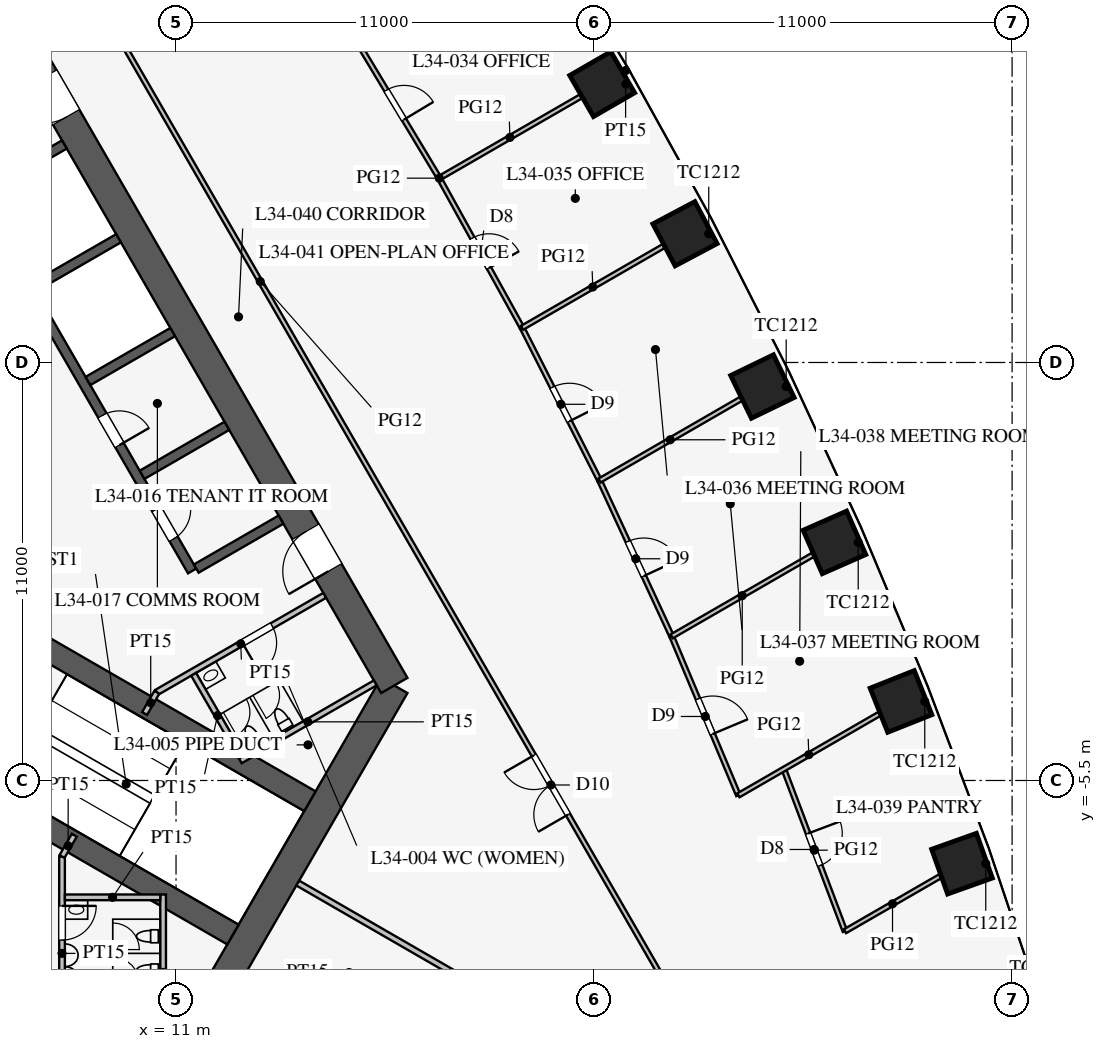
"""IFC4 building model, lengths in metres.
Left out: names, types, materials, properties, quantities, classifications, styles, units other than length and angle.
Written with IfcOpenShell. Run it as: python <this file> out.ifc"""

import sys

from ifc_helpers import new_model, si_unit, direction, frame, frame_2d, origin, origin_2d, place, context, subcontext, project, spatial, rectangle, extrude, element, fill, save


model = new_model("IFC4")
c1 = context("Model", 3, precision=1e-05, world=origin(), true_north=direction((0.0, 1.0)))
c2 = subcontext(c1, "Body", "Model", "MODEL_VIEW")
j1 = project(units=[si_unit("LENGTHUNIT", "METRE"), si_unit("PLANEANGLEUNIT", "RADIAN")], contexts=[c1])
p1 = place(None, origin())
s1 = spatial("IfcSite", under=j1, at=p1, CompositionType="ELEMENT")
p2 = place(p1, origin())
s2 = spatial("IfcBuilding", under=s1, at=p2, CompositionType="ELEMENT")
p3 = place(p2, frame((0.0, 0.0, 149.3)))
s3 = spatial("IfcBuildingStorey", under=s2, at=p3, CompositionType="ELEMENT", Elevation=149.3)
for number, where, z_axis, x_axis in (
    (1, (31.682, -7.689, 0.0), (0.0, 0.0, 1.0), (-0.336, 0.942, 0.0)),
    (2, (30.077, -3.42, 0.0), (0.0, 0.0, 1.0), (-0.37, 0.929, 0.0)),
    (3, (28.325, 0.765, 0.0), (0.0, 0.0, 1.0), (-0.403, 0.915, 0.0)),
    (4, (26.43, 4.867, 0.0), (0.0, 0.0, 1.0), (-0.436, 0.9, 0.0)),
    (5, (24.393, 8.887, 0.0), (0.0, 0.0, 1.0), (-0.468, 0.883, 0.0)),
    (6, (22.213, 12.825, 0.0), (0.0, 0.0, 1.0), (-0.5, 0.866, 0.0)),
):
    element("IfcColumn", number, at=place(p3, frame(where, z_axis=z_axis, x_axis=x_axis)), inside=s3, PredefinedType="COLUMN", context=c2, shape_type="SweptSolid", body=[
        extrude(rectangle(XDim=1.25, YDim=1.25, at=origin_2d()), origin(), (0.0, 0.0, 1.0), 4.2),
    ])
p4 = place(p3, frame((10.97, -13.0, 0.0), z_axis=(0.0, 0.0, 1.0), x_axis=(0.499995765644, 0.866027848477, 0.0)))
e7 = element("IfcWall", 7, at=p4, inside=s3, PredefinedType="SHEAR", context=c2, shape_type="SweptSolid", body=[
    extrude(rectangle(XDim=11.547, YDim=0.8, at=frame_2d((5.773, 0.0))), origin(), (0.0, 0.0, 1.0), 4.2),
])
p5 = place(p3, frame((16.743, -3.0, 0.0), z_axis=(0.0, 0.0, 1.0), x_axis=(-0.500002442456, 0.866023993627, 0.0)))
e8 = element("IfcWall", 8, at=p5, inside=s3, PredefinedType="SHEAR", context=c2, shape_type="SweptSolid", body=[
    extrude(rectangle(XDim=21.939, YDim=0.8, at=frame_2d((10.97, 0.0))), origin(), (0.0, 0.0, 1.0), 4.2),
])
p6 = place(p5, frame((17.27, 0.0, 0.0)))
e9 = element("IfcOpeningElement", 9, at=p6, cuts=e8, PredefinedType="OPENING", context=c2, shape_type="SweptSolid", body=[
    extrude(rectangle(XDim=1.2, YDim=2.1, at=frame_2d((0.6, 1.05))), frame((0.0, 0.41, 0.0), z_axis=(0.0, -1.0, 0.0), x_axis=(1.0, 0.0, 0.0)), (0.0, 0.0, 1.0), 0.82),
])
p7 = place(p5, frame((3.47, 0.0, 0.0)))
e10 = element("IfcOpeningElement", 10, at=p7, cuts=e8, PredefinedType="OPENING", context=c2, shape_type="SweptSolid", body=[
    extrude(rectangle(XDim=1.2, YDim=2.1, at=frame_2d((0.6, 1.05))), frame((0.0, 0.41, 0.0), z_axis=(0.0, -1.0, 0.0), x_axis=(1.0, 0.0, 0.0)), (0.0, 0.0, 1.0), 0.82),
])
p8 = place(p3, frame((11.424, 0.014, 0.0), z_axis=(0.0, 0.0, 1.0), x_axis=(-0.500001763848, 0.866024385424, 0.0)))
e11 = element("IfcWall", 11, at=p8, inside=s3, PredefinedType="SHEAR", context=c2, shape_type="SweptSolid", body=[
    extrude(rectangle(XDim=11.4, YDim=0.25, at=frame_2d((5.7, 0.0))), origin(), (0.0, 0.0, 1.0), 4.2),
])
p9 = place(p8, frame((0.975, 0.0, 0.0)))
e12 = element("IfcOpeningElement", 12, at=p9, cuts=e11, PredefinedType="OPENING", context=c2, shape_type="SweptSolid", body=[
    extrude(rectangle(XDim=0.9, YDim=2.1, at=frame_2d((0.45, 1.05))), frame((0.0, 0.135, 0.0), z_axis=(0.0, -1.0, 0.0), x_axis=(1.0, 0.0, 0.0)), (0.0, 0.0, 1.0), 0.27),
])
p10 = place(p8, frame((3.825, 0.0, 0.0)))
e13 = element("IfcOpeningElement", 13, at=p10, cuts=e11, PredefinedType="OPENING", context=c2, shape_type="SweptSolid", body=[
    extrude(rectangle(XDim=0.9, YDim=2.1, at=frame_2d((0.45, 1.05))), frame((0.0, 0.135, 0.0), z_axis=(0.0, -1.0, 0.0), x_axis=(1.0, 0.0, 0.0)), (0.0, 0.0, 1.0), 0.27),
])
for number, where, z_axis, x_axis in (
    (14, (11.532, 0.076, 0.0), (0.0, 0.0, 1.0), (0.866, 0.5, 0.0)),
    (15, (10.107, 2.544, 0.0), (0.0, 0.0, 1.0), (0.866, 0.5, 0.0)),
    (16, (8.682, 5.012, 0.0), (0.0, 0.0, 1.0), (0.866, 0.5, 0.0)),
    (17, (7.257, 7.481, 0.0), (0.0, 0.0, 1.0), (0.866, 0.5, 0.0)),
):
    element("IfcWall", number, at=place(p3, frame(where, z_axis=z_axis, x_axis=x_axis)), inside=s3, PredefinedType="SHEAR", context=c2, shape_type="SweptSolid", body=[
        extrude(rectangle(XDim=2.575, YDim=0.25, at=frame_2d((1.288, 0.0))), origin(), (0.0, 0.0, 1.0), 4.2),
    ])
p11 = place(p3, frame((5.832, 9.949, 0.0), z_axis=(0.0, 0.0, 1.0), x_axis=(0.866029291668, 0.499993265928, 0.0)))
e18 = element("IfcWall", 18, at=p11, inside=s3, PredefinedType="SHEAR", context=c2, shape_type="SweptSolid", body=[
    extrude(rectangle(XDim=2.575, YDim=0.25, at=frame_2d((1.288, 0.0))), origin(), (0.0, 0.0, 1.0), 4.2),
])
for number, where, z_axis, x_axis in (
    (19, (4.638, -5.016, 0.0), (0.0, 0.0, 1.0), (0.866, -0.5, 0.0)),
    (20, (6.663, -1.509, 0.0), (0.0, 0.0, 1.0), (0.866, -0.5, 0.0)),
):
    element("IfcWall", number, at=place(p3, frame(where, z_axis=z_axis, x_axis=x_axis)), inside=s3, PredefinedType="SHEAR", context=c2, shape_type="SweptSolid", body=[
        extrude(rectangle(XDim=9.075, YDim=0.6, at=frame_2d((4.538, 0.0))), origin(), (0.0, 0.0, 1.0), 4.2),
    ])
p12 = place(p3, frame((8.0, -7.5, 0.0), z_axis=(0.0, 0.0, 1.0), x_axis=(0.0, -1.0, 0.0)))
e21 = element("IfcWall", 21, at=p12, inside=s3, PredefinedType="PARTITIONING", context=c2, shape_type="SweptSolid", body=[
    extrude(rectangle(XDim=5.1, YDim=0.15, at=frame_2d((2.55, 0.0))), origin(), (0.0, 0.0, 1.0), 4.0),
])
p13 = place(p12, frame((1.3, 0.0, 0.0)))
e22 = element("IfcOpeningElement", 22, at=p13, cuts=e21, PredefinedType="OPENING", context=c2, shape_type="SweptSolid", body=[
    extrude(rectangle(XDim=0.9, YDim=2.1, at=frame_2d((0.45, 1.05))), frame((0.0, 0.085, 0.0), z_axis=(0.0, -1.0, 0.0), x_axis=(1.0, 0.0, 0.0)), (0.0, 0.0, 1.0), 0.17),
])
p14 = place(p3, frame((10.495, -3.178, 0.0), z_axis=(0.0, 0.0, 1.0), x_axis=(0.86602216432, 0.500005610874, 0.0)))
e23 = element("IfcWall", 23, at=p14, inside=s3, PredefinedType="PARTITIONING", context=c2, shape_type="SweptSolid", body=[
    extrude(rectangle(XDim=5.1, YDim=0.15, at=frame_2d((2.55, 0.0))), origin(), (0.0, 0.0, 1.0), 4.0),
])
p15 = place(p14, frame((2.6, 0.0, 0.0)))
e24 = element("IfcOpeningElement", 24, at=p15, cuts=e23, PredefinedType="OPENING", context=c2, shape_type="SweptSolid", body=[
    extrude(rectangle(XDim=0.9, YDim=2.1, at=frame_2d((0.45, 1.05))), frame((0.0, 0.085, 0.0), z_axis=(0.0, -1.0, 0.0), x_axis=(1.0, 0.0, 0.0)), (0.0, 0.0, 1.0), 0.17),
])
for number, where, z_axis, x_axis in (
    (25, (8.0, -7.5, 0.0), (0.0, 0.0, 1.0), (0.5, 0.866, 0.0)),
    (26, (10.495, -3.178, 0.0), (0.0, 0.0, 1.0), (-0.5, -0.866, 0.0)),
):
    element("IfcWall", number, at=place(p3, frame(where, z_axis=z_axis, x_axis=x_axis)), inside=s3, PredefinedType="PARTITIONING", context=c2, shape_type="SweptSolid", body=[
        extrude(rectangle(XDim=0.645, YDim=0.15, at=frame_2d((0.323, 0.0))), origin(), (0.0, 0.0, 1.0), 4.0),
    ])
p16 = place(p3, frame((10.66, -8.5, 0.0), z_axis=(0.0, 0.0, 1.0), x_axis=(0.0, -1.0, 0.0)))
e27 = element("IfcWall", 27, at=p16, inside=s3, PredefinedType="PARTITIONING", context=c2, shape_type="SweptSolid", body=[
    extrude(rectangle(XDim=4.1, YDim=0.15, at=frame_2d((2.05, 0.0))), origin(), (0.0, 0.0, 1.0), 4.0),
])
p17 = place(p3, frame((8.075, -8.575, 0.0), z_axis=(0.0, 0.0, 1.0), x_axis=(1.0, 0.0, 0.0)))
e28 = element("IfcWall", 28, at=p17, inside=s3, PredefinedType="PARTITIONING", context=c2, shape_type="SweptSolid", body=[
    extrude(rectangle(XDim=2.51, YDim=0.15, at=frame_2d((1.255, 0.0))), origin(), (0.0, 0.0, 1.0), 4.0),
])
p18 = place(p3, frame((12.691, -4.982, 0.0), z_axis=(0.0, 0.0, 1.0), x_axis=(0.8660249478, 0.500000789788, 0.0)))
e29 = element("IfcWall", 29, at=p18, inside=s3, PredefinedType="PARTITIONING", context=c2, shape_type="SweptSolid", body=[
    extrude(rectangle(XDim=4.1, YDim=0.15, at=frame_2d((2.05, 0.0))), origin(), (0.0, 0.0, 1.0), 4.0),
])
p19 = place(p3, frame((11.464, -2.706, 0.0), z_axis=(0.0, 0.0, 1.0), x_axis=(0.50001992892, -0.866013897511, 0.0)))
e30 = element("IfcWall", 30, at=p19, inside=s3, PredefinedType="PARTITIONING", context=c2, shape_type="SweptSolid", body=[
    extrude(rectangle(XDim=2.51, YDim=0.15, at=frame_2d((1.255, 0.0))), origin(), (0.0, 0.0, 1.0), 4.0),
])
p20 = place(p3, frame((14.203, -8.2, 0.0), z_axis=(0.0, 0.0, 1.0), x_axis=(0.866024668836, -0.500001272966, 0.0)))
e31 = element("IfcWall", 31, at=p20, inside=s3, PredefinedType="PARTITIONING", context=c2, shape_type="SweptSolid", body=[
    extrude(rectangle(XDim=16.65, YDim=0.15, at=frame_2d((8.325, 0.0))), origin(), (0.0, 0.0, 1.0), 2.3),
])
p21 = place(p3, frame((26.415, -15.231, 0.0), z_axis=(0.0, 0.0, 1.0), x_axis=(-0.50000091641, 0.866024874695, 0.0)))
e32 = element("IfcWall", 32, at=p21, inside=s3, PredefinedType="PARTITIONING", context=c2, shape_type="SweptSolid", body=[
    extrude(rectangle(XDim=52.796, YDim=0.12, at=frame_2d((26.398, 0.0))), origin(), (0.0, 0.0, 1.0), 2.9),
])
p22 = place(p21, frame((10.2, 0.0, 0.15)))
e33 = element("IfcOpeningElement", 33, at=p22, cuts=e32, PredefinedType="OPENING", context=c2, shape_type="SweptSolid", body=[
    extrude(rectangle(XDim=1.8, YDim=2.1, at=frame_2d((0.9, 1.05))), frame((0.0, 0.07, 0.0), z_axis=(0.0, -1.0, 0.0), x_axis=(1.0, 0.0, 0.0)), (0.0, 0.0, 1.0), 0.14),
])
p23 = place(p21, frame((40.8, 0.0, 0.15)))
e34 = element("IfcOpeningElement", 34, at=p23, cuts=e32, PredefinedType="OPENING", context=c2, shape_type="SweptSolid", body=[
    extrude(rectangle(XDim=1.8, YDim=2.1, at=frame_2d((0.9, 1.05))), frame((0.0, 0.07, 0.0), z_axis=(0.0, -1.0, 0.0), x_axis=(1.0, 0.0, 0.0)), (0.0, 0.0, 1.0), 0.14),
])
p24 = place(p3, frame((22.758, 13.139, 0.0), z_axis=(0.0, 0.0, 1.0), x_axis=(0.866063163075, 0.499934593286, 0.0)))
e35 = element("IfcWall", 35, at=p24, inside=s3, PredefinedType="PARTITIONING", context=c2, shape_type="SweptSolid", body=[
    extrude(rectangle(XDim=0.166, YDim=0.15, at=frame_2d((0.083, 0.0))), origin(), (0.0, 0.0, 1.0), 2.9),
])
p25 = place(p3, frame((17.927, 10.35, 0.0), z_axis=(0.0, 0.0, 1.0), x_axis=(-0.515548366618, 0.856860479703, 0.0)))
e36 = element("IfcWall", 36, at=p25, inside=s3, PredefinedType="PARTITIONING", context=c2, shape_type="SweptSolid", body=[
    extrude(rectangle(XDim=4.501, YDim=0.12, at=frame_2d((2.25, 0.0))), origin(), (0.0, 0.0, 1.0), 2.9),
])
p26 = place(p25, frame((1.8, 0.0, 0.15)))
e37 = element("IfcOpeningElement", 37, at=p26, cuts=e36, PredefinedType="OPENING", context=c2, shape_type="SweptSolid", body=[
    extrude(rectangle(XDim=0.9, YDim=2.1, at=frame_2d((0.45, 1.05))), frame((0.0, 0.07, 0.0), z_axis=(0.0, -1.0, 0.0), x_axis=(1.0, 0.0, 0.0)), (0.0, 0.0, 1.0), 0.14),
])
p27 = place(p3, frame((24.043, -1.708, 0.0), z_axis=(0.0, 0.0, 1.0), x_axis=(-0.41992827805, 0.90755729367, 0.0)))
e38 = element("IfcWall", 38, at=p27, inside=s3, PredefinedType="PARTITIONING", context=c2, shape_type="SweptSolid", body=[
    extrude(rectangle(XDim=4.519, YDim=0.12, at=frame_2d((2.259, 0.0))), origin(), (0.0, 0.0, 1.0), 2.9),
])
p28 = place(p27, frame((1.75, 0.0, 0.15)))
e39 = element("IfcOpeningElement", 39, at=p28, cuts=e38, PredefinedType="OPENING", context=c2, shape_type="SweptSolid", body=[
    extrude(rectangle(XDim=1.0, YDim=2.1, at=frame_2d((0.5, 1.05))), frame((0.0, 0.07, 0.0), z_axis=(0.0, -1.0, 0.0), x_axis=(1.0, 0.0, 0.0)), (0.0, 0.0, 1.0), 0.14),
])
p29 = place(p3, frame((25.797, -5.891, 0.0), z_axis=(0.0, 0.0, 1.0), x_axis=(-0.386762112496, 0.922179520667, 0.0)))
e40 = element("IfcWall", 40, at=p29, inside=s3, PredefinedType="PARTITIONING", context=c2, shape_type="SweptSolid", body=[
    extrude(rectangle(XDim=4.536, YDim=0.12, at=frame_2d((2.268, 0.0))), origin(), (0.0, 0.0, 1.0), 2.9),
])
p30 = place(p29, frame((1.75, 0.0, 0.15)))
e41 = element("IfcOpeningElement", 41, at=p30, cuts=e40, PredefinedType="OPENING", context=c2, shape_type="SweptSolid", body=[
    extrude(rectangle(XDim=1.0, YDim=2.1, at=frame_2d((0.5, 1.05))), frame((0.0, 0.07, 0.0), z_axis=(0.0, -1.0, 0.0), x_axis=(1.0, 0.0, 0.0)), (0.0, 0.0, 1.0), 0.14),
])
p31 = place(p3, frame((28.602, -9.468, 0.0), z_axis=(0.0, 0.0, 1.0), x_axis=(-0.35291223767, 0.935656428665, 0.0)))
e42 = element("IfcWall", 42, at=p31, inside=s3, PredefinedType="PARTITIONING", context=c2, shape_type="SweptSolid", body=[
    extrude(rectangle(XDim=4.56, YDim=0.12, at=frame_2d((2.28, 0.0))), origin(), (0.0, 0.0, 1.0), 2.9),
])
p32 = place(p31, frame((1.85, 0.0, 0.15)))
e43 = element("IfcOpeningElement", 43, at=p32, cuts=e42, PredefinedType="OPENING", context=c2, shape_type="SweptSolid", body=[
    extrude(rectangle(XDim=0.9, YDim=2.1, at=frame_2d((0.45, 1.05))), frame((0.0, 0.07, 0.0), z_axis=(0.0, -1.0, 0.0), x_axis=(1.0, 0.0, 0.0)), (0.0, 0.0, 1.0), 0.14),
])
p33 = place(p3, frame((20.106, 6.412, 0.0), z_axis=(0.0, 0.0, 1.0), x_axis=(-0.484292898211, 0.874905931368, 0.0)))
e44 = element("IfcWall", 44, at=p33, inside=s3, PredefinedType="PARTITIONING", context=c2, shape_type="SweptSolid", body=[
    extrude(rectangle(XDim=4.501, YDim=0.12, at=frame_2d((2.25, 0.0))), origin(), (0.0, 0.0, 1.0), 2.9),
])
p34 = place(p33, frame((1.8, 0.0, 0.15)))
e45 = element("IfcOpeningElement", 45, at=p34, cuts=e44, PredefinedType="OPENING", context=c2, shape_type="SweptSolid", body=[
    extrude(rectangle(XDim=0.9, YDim=2.1, at=frame_2d((0.45, 1.05))), frame((0.0, 0.07, 0.0), z_axis=(0.0, -1.0, 0.0), x_axis=(1.0, 0.0, 0.0)), (0.0, 0.0, 1.0), 0.14),
])
p35 = place(p3, frame((22.145, 2.393, 0.0), z_axis=(0.0, 0.0, 1.0), x_axis=(-0.452471679136, 0.891778772779, 0.0)))
e46 = element("IfcWall", 46, at=p35, inside=s3, PredefinedType="PARTITIONING", context=c2, shape_type="SweptSolid", body=[
    extrude(rectangle(XDim=4.507, YDim=0.12, at=frame_2d((2.253, 0.0))), origin(), (0.0, 0.0, 1.0), 2.9),
])
p36 = place(p35, frame((1.75, 0.0, 0.15)))
e47 = element("IfcOpeningElement", 47, at=p36, cuts=e46, PredefinedType="OPENING", context=c2, shape_type="SweptSolid", body=[
    extrude(rectangle(XDim=1.0, YDim=2.1, at=frame_2d((0.5, 1.05))), frame((0.0, 0.07, 0.0), z_axis=(0.0, -1.0, 0.0), x_axis=(1.0, 0.0, 0.0)), (0.0, 0.0, 1.0), 0.14),
])
p37 = place(p3, frame((17.927, 10.35, 0.0), z_axis=(0.0, 0.0, 1.0), x_axis=(0.866023714033, 0.500002926724, 0.0)))
e48 = element("IfcWall", 48, at=p37, inside=s3, PredefinedType="PARTITIONING", context=c2, shape_type="SweptSolid", body=[
    extrude(rectangle(XDim=4.295, YDim=0.12, at=frame_2d((2.147, 0.0))), origin(), (0.0, 0.0, 1.0), 2.9),
])
p38 = place(p3, frame((24.043, -1.708, 0.0), z_axis=(0.0, 0.0, 1.0), x_axis=(0.866015805976, 0.500016623523, 0.0)))
e49 = element("IfcWall", 49, at=p38, inside=s3, PredefinedType="PARTITIONING", context=c2, shape_type="SweptSolid", body=[
    extrude(rectangle(XDim=4.286, YDim=0.12, at=frame_2d((2.143, 0.0))), origin(), (0.0, 0.0, 1.0), 2.9),
])
p39 = place(p3, frame((25.797, -5.891, 0.0), z_axis=(0.0, 0.0, 1.0), x_axis=(0.866019337872, 0.500010506321, 0.0)))
e50 = element("IfcWall", 50, at=p39, inside=s3, PredefinedType="PARTITIONING", context=c2, shape_type="SweptSolid", body=[
    extrude(rectangle(XDim=4.28, YDim=0.12, at=frame_2d((2.14, 0.0))), origin(), (0.0, 0.0, 1.0), 2.9),
])
p40 = place(p3, frame((28.602, -9.468, 0.0), z_axis=(0.0, 0.0, 1.0), x_axis=(0.866051988355, 0.499953951347, 0.0)))
e51 = element("IfcWall", 51, at=p40, inside=s3, PredefinedType="PARTITIONING", context=c2, shape_type="SweptSolid", body=[
    extrude(rectangle(XDim=2.891, YDim=0.12, at=frame_2d((1.445, 0.0))), origin(), (0.0, 0.0, 1.0), 2.9),
])
p41 = place(p3, frame((20.106, 6.412, 0.0), z_axis=(0.0, 0.0, 1.0), x_axis=(0.866030310389, 0.499991501415, 0.0)))
e52 = element("IfcWall", 52, at=p41, inside=s3, PredefinedType="PARTITIONING", context=c2, shape_type="SweptSolid", body=[
    extrude(rectangle(XDim=4.294, YDim=0.12, at=frame_2d((2.147, 0.0))), origin(), (0.0, 0.0, 1.0), 2.9),
])
p42 = place(p3, frame((22.145, 2.393, 0.0), z_axis=(0.0, 0.0, 1.0), x_axis=(0.866035893414, 0.499981830989, 0.0)))
e53 = element("IfcWall", 53, at=p42, inside=s3, PredefinedType="PARTITIONING", context=c2, shape_type="SweptSolid", body=[
    extrude(rectangle(XDim=4.291, YDim=0.12, at=frame_2d((2.146, 0.0))), origin(), (0.0, 0.0, 1.0), 2.9),
])
p43 = place(p13, origin())
e54 = element("IfcDoor", 54, at=p43, inside=s3, OperationType="SINGLE_SWING_LEFT", PredefinedType="DOOR", context=c2, shape_type="SweptSolid", body=[
    extrude(rectangle(XDim=0.9, YDim=2.1, at=frame_2d((0.45, 1.05))), frame((0.0, 0.025, 0.0), z_axis=(0.0, -1.0, 0.0), x_axis=(1.0, 0.0, 0.0)), (0.0, 0.0, 1.0), 0.05),
])
fill(e22, e54)
p44 = place(p15, frame((0.9, 0.0, 0.0), z_axis=(0.0, 0.0, 1.0), x_axis=(-1.0, 0.0, 0.0)))
e55 = element("IfcDoor", 55, at=p44, inside=s3, OperationType="SINGLE_SWING_RIGHT", PredefinedType="DOOR", context=c2, shape_type="SweptSolid", body=[
    extrude(rectangle(XDim=0.9, YDim=2.1, at=frame_2d((0.45, 1.05))), frame((0.0, 0.025, 0.0), z_axis=(0.0, -1.0, 0.0), x_axis=(1.0, 0.0, 0.0)), (0.0, 0.0, 1.0), 0.05),
])
fill(e24, e55)
p45 = place(p6, origin())
e56 = element("IfcDoor", 56, at=p45, inside=s3, OperationType="SINGLE_SWING_RIGHT", PredefinedType="DOOR", context=c2, shape_type="SweptSolid", body=[
    extrude(rectangle(XDim=1.2, YDim=2.1, at=frame_2d((0.6, 1.05))), frame((0.0, 0.025, 0.0), z_axis=(0.0, -1.0, 0.0), x_axis=(1.0, 0.0, 0.0)), (0.0, 0.0, 1.0), 0.05),
])
fill(e9, e56)
p46 = place(p7, origin())
e57 = element("IfcDoor", 57, at=p46, inside=s3, OperationType="SINGLE_SWING_LEFT", PredefinedType="DOOR", context=c2, shape_type="SweptSolid", body=[
    extrude(rectangle(XDim=1.2, YDim=2.1, at=frame_2d((0.6, 1.05))), frame((0.0, 0.025, 0.0), z_axis=(0.0, -1.0, 0.0), x_axis=(1.0, 0.0, 0.0)), (0.0, 0.0, 1.0), 0.05),
])
fill(e10, e57)
p47 = place(p9, frame((0.9, 0.0, 0.0), z_axis=(0.0, 0.0, 1.0), x_axis=(-1.0, 0.0, 0.0)))
e58 = element("IfcDoor", 58, at=p47, inside=s3, OperationType="SINGLE_SWING_LEFT", PredefinedType="DOOR", context=c2, shape_type="SweptSolid", body=[
    extrude(rectangle(XDim=0.9, YDim=2.1, at=frame_2d((0.45, 1.05))), frame((0.0, 0.025, 0.0), z_axis=(0.0, -1.0, 0.0), x_axis=(1.0, 0.0, 0.0)), (0.0, 0.0, 1.0), 0.05),
])
fill(e12, e58)
p48 = place(p10, frame((0.9, 0.0, 0.0), z_axis=(0.0, 0.0, 1.0), x_axis=(-1.0, 0.0, 0.0)))
e59 = element("IfcDoor", 59, at=p48, inside=s3, OperationType="SINGLE_SWING_RIGHT", PredefinedType="DOOR", context=c2, shape_type="SweptSolid", body=[
    extrude(rectangle(XDim=0.9, YDim=2.1, at=frame_2d((0.45, 1.05))), frame((0.0, 0.025, 0.0), z_axis=(0.0, -1.0, 0.0), x_axis=(1.0, 0.0, 0.0)), (0.0, 0.0, 1.0), 0.05),
])
fill(e13, e59)
p49 = place(p26, frame((0.9, 0.0, 0.0), z_axis=(0.0, 0.0, 1.0), x_axis=(-1.0, 0.0, 0.0)))
e60 = element("IfcDoor", 60, at=p49, inside=s3, OperationType="SINGLE_SWING_RIGHT", PredefinedType="DOOR", context=c2, shape_type="SweptSolid", body=[
    extrude(rectangle(XDim=0.9, YDim=2.1, at=frame_2d((0.45, 1.05))), frame((0.0, 0.025, 0.0), z_axis=(0.0, -1.0, 0.0), x_axis=(1.0, 0.0, 0.0)), (0.0, 0.0, 1.0), 0.05),
])
fill(e37, e60)
p50 = place(p34, frame((0.9, 0.0, 0.0), z_axis=(0.0, 0.0, 1.0), x_axis=(-1.0, 0.0, 0.0)))
e61 = element("IfcDoor", 61, at=p50, inside=s3, OperationType="SINGLE_SWING_RIGHT", PredefinedType="DOOR", context=c2, shape_type="SweptSolid", body=[
    extrude(rectangle(XDim=0.9, YDim=2.1, at=frame_2d((0.45, 1.05))), frame((0.0, 0.025, 0.0), z_axis=(0.0, -1.0, 0.0), x_axis=(1.0, 0.0, 0.0)), (0.0, 0.0, 1.0), 0.05),
])
fill(e45, e61)
p51 = place(p36, frame((1.0, 0.0, 0.0), z_axis=(0.0, 0.0, 1.0), x_axis=(-1.0, 0.0, 0.0)))
e62 = element("IfcDoor", 62, at=p51, inside=s3, OperationType="SINGLE_SWING_RIGHT", PredefinedType="DOOR", context=c2, shape_type="SweptSolid", body=[
    extrude(rectangle(XDim=1.0, YDim=2.1, at=frame_2d((0.5, 1.05))), frame((0.0, 0.025, 0.0), z_axis=(0.0, -1.0, 0.0), x_axis=(1.0, 0.0, 0.0)), (0.0, 0.0, 1.0), 0.05),
])
fill(e47, e62)
p52 = place(p28, frame((1.0, 0.0, 0.0), z_axis=(0.0, 0.0, 1.0), x_axis=(-1.0, 0.0, 0.0)))
e63 = element("IfcDoor", 63, at=p52, inside=s3, OperationType="SINGLE_SWING_RIGHT", PredefinedType="DOOR", context=c2, shape_type="SweptSolid", body=[
    extrude(rectangle(XDim=1.0, YDim=2.1, at=frame_2d((0.5, 1.05))), frame((0.0, 0.025, 0.0), z_axis=(0.0, -1.0, 0.0), x_axis=(1.0, 0.0, 0.0)), (0.0, 0.0, 1.0), 0.05),
])
fill(e39, e63)
p53 = place(p30, frame((1.0, 0.0, 0.0), z_axis=(0.0, 0.0, 1.0), x_axis=(-1.0, 0.0, 0.0)))
e64 = element("IfcDoor", 64, at=p53, inside=s3, OperationType="SINGLE_SWING_RIGHT", PredefinedType="DOOR", context=c2, shape_type="SweptSolid", body=[
    extrude(rectangle(XDim=1.0, YDim=2.1, at=frame_2d((0.5, 1.05))), frame((0.0, 0.025, 0.0), z_axis=(0.0, -1.0, 0.0), x_axis=(1.0, 0.0, 0.0)), (0.0, 0.0, 1.0), 0.05),
])
fill(e41, e64)
p54 = place(p32, frame((0.9, 0.0, 0.0), z_axis=(0.0, 0.0, 1.0), x_axis=(-1.0, 0.0, 0.0)))
e65 = element("IfcDoor", 65, at=p54, inside=s3, OperationType="SINGLE_SWING_LEFT", PredefinedType="DOOR", context=c2, shape_type="SweptSolid", body=[
    extrude(rectangle(XDim=0.9, YDim=2.1, at=frame_2d((0.45, 1.05))), frame((0.0, 0.025, 0.0), z_axis=(0.0, -1.0, 0.0), x_axis=(1.0, 0.0, 0.0)), (0.0, 0.0, 1.0), 0.05),
])
fill(e43, e65)
p55 = place(p22, origin())
e66 = element("IfcDoor", 66, at=p55, inside=s3, OperationType="DOUBLE_DOOR_SINGLE_SWING", PredefinedType="DOOR", context=c2, shape_type="SweptSolid", body=[
    extrude(rectangle(XDim=1.8, YDim=2.1, at=frame_2d((0.9, 1.05))), frame((0.0, 0.025, 0.0), z_axis=(0.0, -1.0, 0.0), x_axis=(1.0, 0.0, 0.0)), (0.0, 0.0, 1.0), 0.05),
])
fill(e33, e66)
save(model, sys.argv[1])
